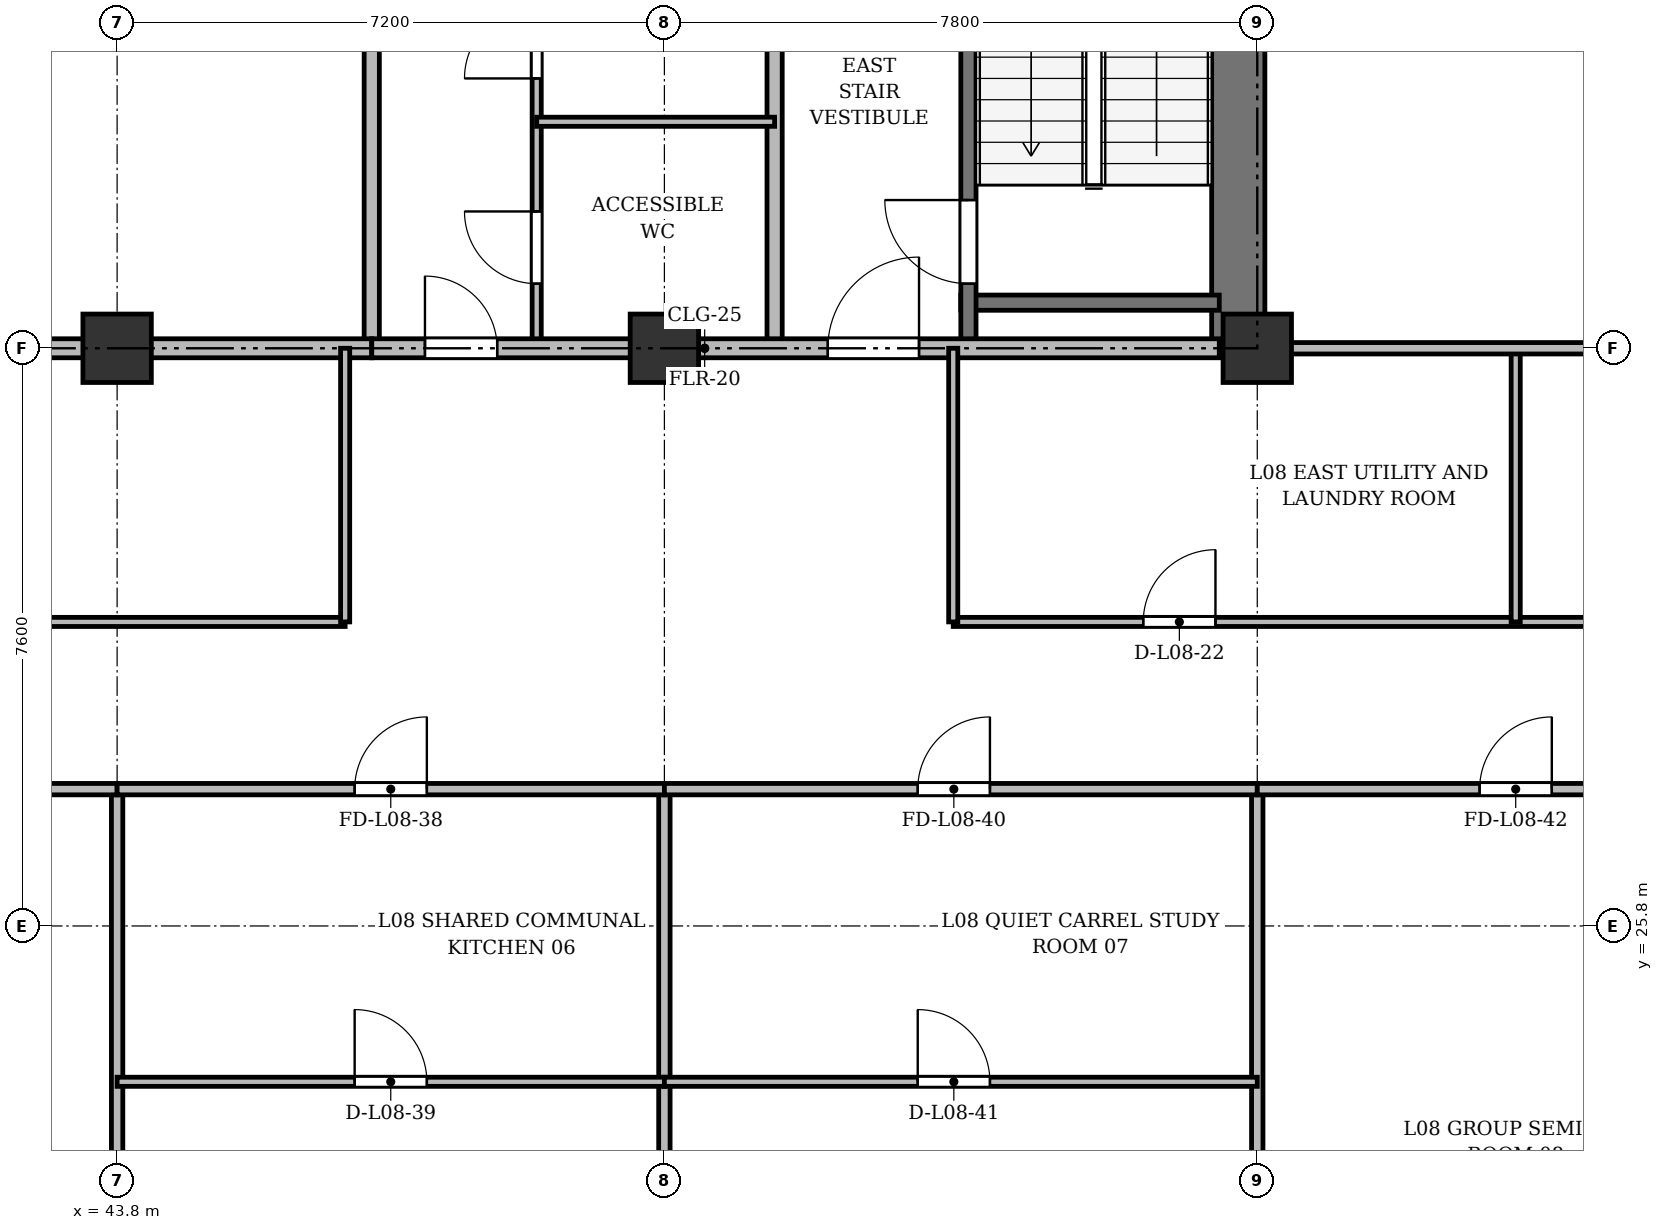
"""IFC4 building model, lengths in metres.
Left out: names, types, materials, properties, quantities, classifications, styles, units other than length and angle.
Written with IfcOpenShell. Run it as: python <this file> out.ifc"""

import sys

from ifc_helpers import new_model, si_unit, direction, frame, frame_2d, origin, origin_2d, place, context, subcontext, project, spatial, rectangle, extrude, source, transform, mapped, element, fill, save


model = new_model("IFC4")
c1 = context("Model", 3, precision=1e-05, world=origin(), true_north=direction((0.0, 1.0)))
c2 = subcontext(c1, "Body", "Model", "MODEL_VIEW")
j1 = project(units=[si_unit("LENGTHUNIT", "METRE"), si_unit("PLANEANGLEUNIT", "RADIAN")], contexts=[c1])
p1 = place(None, origin())
s1 = spatial("IfcSite", under=j1, at=p1, CompositionType="ELEMENT")
p2 = place(p1, origin())
s2 = spatial("IfcBuilding", under=s1, at=p2, CompositionType="ELEMENT")
p3 = place(p2, frame((0.0, 0.0, 34.3)))
s3 = spatial("IfcBuildingStorey", under=s2, at=p3, CompositionType="ELEMENT", Elevation=34.3)
m1 = source(origin(), c2, "Body", "SweptSolid", [
    extrude(rectangle(XDim=0.9, YDim=0.9, at=origin_2d()), origin(), (0.0, 0.0, 1.0), 3.6),
])
for number, where, z_axis, x_axis in (
    (1, (43.8, 33.4, 0.0), (0.0, 0.0, 1.0), (1.0, 0.0, 0.0)),
    (2, (51.0, 33.4, 0.0), (0.0, 0.0, 1.0), (1.0, 0.0, 0.0)),
    (3, (58.8, 33.4, 0.0), (0.0, 0.0, 1.0), (1.0, 0.0, 0.0)),
):
    element("IfcColumn", number, at=place(p3, frame(where, z_axis=z_axis, x_axis=x_axis)), inside=s3, PredefinedType="COLUMN", context=c2, shape_type="MappedRepresentation", body=[
        mapped(m1, transform((0.0, 0.0, 0.0), x_axis=(1.0, 0.0, 0.0), y_axis=(0.0, 1.0, 0.0), z_axis=(0.0, 0.0, 1.0), scale=1.0)),
    ])
p4 = place(p3, frame((58.55, 33.4, 0.0), z_axis=(0.0, 0.0, 1.0), x_axis=(0.0, 1.0, 0.0)))
e4 = element("IfcWall", 4, at=p4, inside=s3, PredefinedType="SHEAR", context=c2, shape_type="SweptSolid", body=[
    extrude(rectangle(XDim=11.7, YDim=0.7, at=frame_2d((5.85, 0.0))), origin(), (0.0, 0.0, 1.0), 3.34),
])
p5 = place(p3, frame((54.9, 34.0, 0.0), z_axis=(0.0, 0.0, 1.0), x_axis=(1.0, 0.0, 0.0)))
e5 = element("IfcWall", 5, at=p5, inside=s3, PredefinedType="SHEAR", context=c2, shape_type="SweptSolid", body=[
    extrude(rectangle(XDim=3.4, YDim=0.2, at=frame_2d((1.7, 0.0))), origin(), (0.0, 0.0, 1.0), 3.34),
])
p6 = place(p3, frame((55.0, 33.4, 0.0), z_axis=(0.0, 0.0, 1.0), x_axis=(0.0, 1.0, 0.0)))
e6 = element("IfcWall", 6, at=p6, inside=s3, PredefinedType="SHEAR", context=c2, shape_type="SweptSolid", body=[
    extrude(rectangle(XDim=11.1, YDim=0.2, at=frame_2d((5.55, 0.0))), origin(), (0.0, 0.0, 1.0), 3.34),
])
p7 = place(p6, frame((0.85, 0.0, 0.0)))
e7 = element("IfcOpeningElement", 7, at=p7, cuts=e6, PredefinedType="OPENING", context=c2, shape_type="SweptSolid", body=[
    extrude(rectangle(XDim=1.1, YDim=2.15, at=frame_2d((0.55, 1.075))), frame((0.0, 0.11, 0.0), z_axis=(0.0, -1.0, 0.0), x_axis=(1.0, 0.0, 0.0)), (0.0, 0.0, 1.0), 0.22),
])
p8 = place(p3, frame((47.15, 33.4, 0.0), z_axis=(0.0, 0.0, 1.0), x_axis=(0.0, 1.0, 0.0)))
e8 = element("IfcWall", 8, at=p8, inside=s3, PredefinedType="SOLIDWALL", context=c2, shape_type="SweptSolid", body=[
    extrude(rectangle(XDim=11.3, YDim=0.2, at=frame_2d((5.65, 0.0))), origin(), (0.0, 0.0, 1.0), 2.69),
])
p9 = place(p3, frame((26.3, 33.4, 0.0), z_axis=(0.0, 0.0, 1.0), x_axis=(1.0, 0.0, 0.0)))
e9 = element("IfcWall", 9, at=p9, inside=s3, PredefinedType="PARTITIONING", context=c2, shape_type="SweptSolid", body=[
    extrude(rectangle(XDim=20.85, YDim=0.25, at=frame_2d((10.425, 0.0))), origin(), (0.0, 0.0, 1.0), 2.69),
])
p10 = place(p9, frame((9.2, 0.0, 0.0)))
e10 = element("IfcOpeningElement", 10, at=p10, cuts=e9, PredefinedType="OPENING", context=c2, shape_type="SweptSolid", body=[
    extrude(rectangle(XDim=1.6, YDim=2.2, at=frame_2d((0.8, 1.1))), frame((0.0, 0.135, 0.0), z_axis=(0.0, -1.0, 0.0), x_axis=(1.0, 0.0, 0.0)), (0.0, 0.0, 1.0), 0.27),
])
p11 = place(p3, frame((52.45, 33.4, 0.0), z_axis=(0.0, 0.0, 1.0), x_axis=(0.0, 1.0, 0.0)))
e11 = element("IfcWall", 11, at=p11, inside=s3, PredefinedType="PARTITIONING", context=c2, shape_type="SweptSolid", body=[
    extrude(rectangle(XDim=8.65, YDim=0.2, at=frame_2d((4.325, 0.0))), origin(), (0.0, 0.0, 1.0), 2.69),
])
p12 = place(p11, frame((6.2, 0.0, 0.0)))
e12 = element("IfcOpeningElement", 12, at=p12, cuts=e11, PredefinedType="OPENING", context=c2, shape_type="SweptSolid", body=[
    extrude(rectangle(XDim=0.95, YDim=2.15, at=frame_2d((0.475, 1.075))), frame((0.0, 0.11, 0.0), z_axis=(0.0, -1.0, 0.0), x_axis=(1.0, 0.0, 0.0)), (0.0, 0.0, 1.0), 0.22),
])
p13 = place(p3, frame((49.32, 33.4, 0.0), z_axis=(0.0, 0.0, 1.0), x_axis=(0.0, 1.0, 0.0)))
e13 = element("IfcWall", 13, at=p13, inside=s3, PredefinedType="PARTITIONING", context=c2, shape_type="SweptSolid", body=[
    extrude(rectangle(XDim=8.6, YDim=0.12, at=frame_2d((4.3, 0.0))), origin(), (0.0, 0.0, 1.0), 2.69),
])
p14 = place(p13, frame((0.85, 0.0, 0.0)))
e14 = element("IfcOpeningElement", 14, at=p14, cuts=e13, PredefinedType="OPENING", context=c2, shape_type="SweptSolid", body=[
    extrude(rectangle(XDim=0.95, YDim=2.15, at=frame_2d((0.475, 1.075))), frame((0.0, 0.07, 0.0), z_axis=(0.0, -1.0, 0.0), x_axis=(1.0, 0.0, 0.0)), (0.0, 0.0, 1.0), 0.14),
])
p15 = place(p13, frame((3.55, 0.0, 0.0)))
e15 = element("IfcOpeningElement", 15, at=p15, cuts=e13, PredefinedType="OPENING", context=c2, shape_type="SweptSolid", body=[
    extrude(rectangle(XDim=0.95, YDim=2.15, at=frame_2d((0.475, 1.075))), frame((0.0, 0.07, 0.0), z_axis=(0.0, -1.0, 0.0), x_axis=(1.0, 0.0, 0.0)), (0.0, 0.0, 1.0), 0.14),
])
p16 = place(p13, frame((6.3, 0.0, 0.0)))
e16 = element("IfcOpeningElement", 16, at=p16, cuts=e13, PredefinedType="OPENING", context=c2, shape_type="SweptSolid", body=[
    extrude(rectangle(XDim=0.95, YDim=2.15, at=frame_2d((0.475, 1.075))), frame((0.0, 0.07, 0.0), z_axis=(0.0, -1.0, 0.0), x_axis=(1.0, 0.0, 0.0)), (0.0, 0.0, 1.0), 0.14),
])
p17 = place(p3, frame((49.32, 36.38, 0.0), z_axis=(0.0, 0.0, 1.0), x_axis=(1.0, 0.0, 0.0)))
e17 = element("IfcWall", 17, at=p17, inside=s3, PredefinedType="PARTITIONING", context=c2, shape_type="SweptSolid", body=[
    extrude(rectangle(XDim=3.13, YDim=0.12, at=frame_2d((1.565, 0.0))), origin(), (0.0, 0.0, 1.0), 2.752),
])
p18 = place(p3, frame((47.15, 33.4, 0.0), z_axis=(0.0, 0.0, 1.0), x_axis=(1.0, 0.0, 0.0)))
e18 = element("IfcWall", 18, at=p18, inside=s3, PredefinedType="PARTITIONING", context=c2, shape_type="SweptSolid", body=[
    extrude(rectangle(XDim=11.15, YDim=0.25, at=frame_2d((5.575, 0.0))), origin(), (0.0, 0.0, 1.0), 2.69),
])
p19 = place(p18, frame((0.7, 0.0, 0.0)))
e19 = element("IfcOpeningElement", 19, at=p19, cuts=e18, PredefinedType="OPENING", context=c2, shape_type="SweptSolid", body=[
    extrude(rectangle(XDim=0.95, YDim=2.15, at=frame_2d((0.475, 1.075))), frame((0.0, 0.135, 0.0), z_axis=(0.0, -1.0, 0.0), x_axis=(1.0, 0.0, 0.0)), (0.0, 0.0, 1.0), 0.27),
])
p20 = place(p18, frame((6.0, 0.0, 0.0)))
e20 = element("IfcOpeningElement", 20, at=p20, cuts=e18, PredefinedType="OPENING", context=c2, shape_type="SweptSolid", body=[
    extrude(rectangle(XDim=1.2, YDim=2.15, at=frame_2d((0.6, 1.075))), frame((0.0, 0.135, 0.0), z_axis=(0.0, -1.0, 0.0), x_axis=(1.0, 0.0, 0.0)), (0.0, 0.0, 1.0), 0.27),
])
p21 = place(p3, frame((38.2, 29.8, 0.0), z_axis=(0.0, 0.0, 1.0), x_axis=(1.0, 0.0, 0.0)))
e21 = element("IfcWall", 21, at=p21, inside=s3, PredefinedType="PARTITIONING", context=c2, shape_type="SweptSolid", body=[
    extrude(rectangle(XDim=8.6, YDim=0.12, at=frame_2d((4.3, 0.0))), origin(), (0.0, 0.0, 1.0), 2.752),
])
p22 = place(p21, frame((3.462, 0.0, 0.0)))
e22 = element("IfcOpeningElement", 22, at=p22, cuts=e21, PredefinedType="OPENING", context=c2, shape_type="SweptSolid", body=[
    extrude(rectangle(XDim=0.95, YDim=2.15, at=frame_2d((0.475, 1.075))), frame((0.0, 0.07, 0.0), z_axis=(0.0, -1.0, 0.0), x_axis=(1.0, 0.0, 0.0)), (0.0, 0.0, 1.0), 0.14),
])
p23 = place(p3, frame((54.8, 29.8, 0.0), z_axis=(0.0, 0.0, 1.0), x_axis=(1.0, 0.0, 0.0)))
e23 = element("IfcWall", 23, at=p23, inside=s3, PredefinedType="PARTITIONING", context=c2, shape_type="SweptSolid", body=[
    extrude(rectangle(XDim=14.85, YDim=0.12, at=frame_2d((7.425, 0.0))), origin(), (0.0, 0.0, 1.0), 2.752),
])
p24 = place(p23, frame((2.5, 0.0, 0.0)))
e24 = element("IfcOpeningElement", 24, at=p24, cuts=e23, PredefinedType="OPENING", context=c2, shape_type="SweptSolid", body=[
    extrude(rectangle(XDim=0.95, YDim=2.15, at=frame_2d((0.475, 1.075))), frame((0.0, 0.07, 0.0), z_axis=(0.0, -1.0, 0.0), x_axis=(1.0, 0.0, 0.0)), (0.0, 0.0, 1.0), 0.14),
])
p25 = place(p23, frame((9.2, 0.0, 0.0)))
e25 = element("IfcOpeningElement", 25, at=p25, cuts=e23, PredefinedType="OPENING", context=c2, shape_type="SweptSolid", body=[
    extrude(rectangle(XDim=0.95, YDim=2.15, at=frame_2d((0.475, 1.075))), frame((0.0, 0.07, 0.0), z_axis=(0.0, -1.0, 0.0), x_axis=(1.0, 0.0, 0.0)), (0.0, 0.0, 1.0), 0.14),
])
for number, where, z_axis, x_axis in (
    (26, (62.2, 29.8, 0.0), (0.0, 0.0, 1.0), (0.0, 1.0, 0.0)),
    (27, (46.8, 29.8, 0.0), (0.0, 0.0, 1.0), (0.0, 1.0, 0.0)),
    (28, (54.8, 29.8, 0.0), (0.0, 0.0, 1.0), (0.0, 1.0, 0.0)),
):
    element("IfcWall", number, at=place(p3, frame(where, z_axis=z_axis, x_axis=x_axis)), inside=s3, PredefinedType="PARTITIONING", context=c2, shape_type="SweptSolid", body=[
        extrude(rectangle(XDim=3.6, YDim=0.12, at=frame_2d((1.8, 0.0))), origin(), (0.0, 0.0, 1.0), 2.69),
    ])
p26 = place(p3, frame((58.8, 33.4, 0.0), z_axis=(0.0, 0.0, 1.0), x_axis=(1.0, 0.0, 0.0)))
e29 = element("IfcWall", 29, at=p26, inside=s3, PredefinedType="PARTITIONING", context=c2, shape_type="SweptSolid", body=[
    extrude(rectangle(XDim=10.85, YDim=0.15, at=frame_2d((5.425, 0.0))), origin(), (0.0, 0.0, 1.0), 2.69),
])
p27 = place(p26, frame((4.76, 0.0, 0.0)))
e30 = element("IfcOpeningElement", 30, at=p27, cuts=e29, PredefinedType="OPENING", context=c2, shape_type="SweptSolid", body=[
    extrude(rectangle(XDim=0.95, YDim=2.15, at=frame_2d((0.475, 1.075))), frame((0.0, 0.085, 0.0), z_axis=(0.0, -1.0, 0.0), x_axis=(1.0, 0.0, 0.0)), (0.0, 0.0, 1.0), 0.17),
])
for number, where, z_axis, x_axis in (
    (31, (43.8, 3.145, 0.0), (0.0, 0.0, 1.0), (0.0, 1.0, 0.0)),
    (32, (51.0, 3.145, 0.0), (0.0, 0.0, 1.0), (0.0, 1.0, 0.0)),
    (33, (58.8, 3.145, 0.0), (0.0, 0.0, 1.0), (0.0, 1.0, 0.0)),
):
    element("IfcWall", number, at=place(p3, frame(where, z_axis=z_axis, x_axis=x_axis)), inside=s3, PredefinedType="PARTITIONING", context=c2, shape_type="SweptSolid", body=[
        extrude(rectangle(XDim=24.455, YDim=0.15, at=frame_2d((12.228, 0.0))), origin(), (0.0, 0.0, 1.0), 2.752),
    ])
p28 = place(p3, frame((30.6, 27.6, 0.0), z_axis=(0.0, 0.0, 1.0), x_axis=(1.0, 0.0, 0.0)))
e34 = element("IfcWall", 34, at=p28, inside=s3, PredefinedType="PARTITIONING", context=c2, shape_type="SweptSolid", body=[
    extrude(rectangle(XDim=13.2, YDim=0.15, at=frame_2d((6.6, 0.0))), origin(), (0.0, 0.0, 1.0), 2.752),
])
p29 = place(p28, frame((5.8, 0.0, 0.0)))
e35 = element("IfcOpeningElement", 35, at=p29, cuts=e34, PredefinedType="OPENING", context=c2, shape_type="SweptSolid", body=[
    extrude(rectangle(XDim=1.6, YDim=2.2, at=frame_2d((0.8, 1.1))), frame((0.0, 0.085, 0.0), z_axis=(0.0, -1.0, 0.0), x_axis=(1.0, 0.0, 0.0)), (0.0, 0.0, 1.0), 0.17),
])
p30 = place(p3, frame((43.8, 27.6, 0.0), z_axis=(0.0, 0.0, 1.0), x_axis=(1.0, 0.0, 0.0)))
e36 = element("IfcWall", 36, at=p30, inside=s3, PredefinedType="PARTITIONING", context=c2, shape_type="SweptSolid", body=[
    extrude(rectangle(XDim=7.2, YDim=0.15, at=frame_2d((3.6, 0.0))), origin(), (0.0, 0.0, 1.0), 2.752),
])
p31 = place(p30, frame((3.125, 0.0, 0.0)))
e37 = element("IfcOpeningElement", 37, at=p31, cuts=e36, PredefinedType="OPENING", context=c2, shape_type="SweptSolid", body=[
    extrude(rectangle(XDim=0.95, YDim=2.15, at=frame_2d((0.475, 1.075))), frame((0.0, 0.085, 0.0), z_axis=(0.0, -1.0, 0.0), x_axis=(1.0, 0.0, 0.0)), (0.0, 0.0, 1.0), 0.17),
])
p32 = place(p3, frame((43.8, 23.75, 0.0), z_axis=(0.0, 0.0, 1.0), x_axis=(1.0, 0.0, 0.0)))
e38 = element("IfcWall", 38, at=p32, inside=s3, PredefinedType="PARTITIONING", context=c2, shape_type="SweptSolid", body=[
    extrude(rectangle(XDim=7.2, YDim=0.12, at=frame_2d((3.6, 0.0))), origin(), (0.0, 0.0, 1.0), 2.752),
])
p33 = place(p32, frame((3.125, 0.0, 0.0)))
e39 = element("IfcOpeningElement", 39, at=p33, cuts=e38, PredefinedType="OPENING", context=c2, shape_type="SweptSolid", body=[
    extrude(rectangle(XDim=0.95, YDim=2.15, at=frame_2d((0.475, 1.075))), frame((0.0, 0.07, 0.0), z_axis=(0.0, -1.0, 0.0), x_axis=(1.0, 0.0, 0.0)), (0.0, 0.0, 1.0), 0.14),
])
p34 = place(p3, frame((51.0, 27.6, 0.0), z_axis=(0.0, 0.0, 1.0), x_axis=(1.0, 0.0, 0.0)))
e40 = element("IfcWall", 40, at=p34, inside=s3, PredefinedType="PARTITIONING", context=c2, shape_type="SweptSolid", body=[
    extrude(rectangle(XDim=7.8, YDim=0.15, at=frame_2d((3.9, 0.0))), origin(), (0.0, 0.0, 1.0), 2.752),
])
p35 = place(p34, frame((3.333, 0.0, 0.0)))
e41 = element("IfcOpeningElement", 41, at=p35, cuts=e40, PredefinedType="OPENING", context=c2, shape_type="SweptSolid", body=[
    extrude(rectangle(XDim=0.95, YDim=2.15, at=frame_2d((0.475, 1.075))), frame((0.0, 0.085, 0.0), z_axis=(0.0, -1.0, 0.0), x_axis=(1.0, 0.0, 0.0)), (0.0, 0.0, 1.0), 0.17),
])
p36 = place(p3, frame((51.0, 23.75, 0.0), z_axis=(0.0, 0.0, 1.0), x_axis=(1.0, 0.0, 0.0)))
e42 = element("IfcWall", 42, at=p36, inside=s3, PredefinedType="PARTITIONING", context=c2, shape_type="SweptSolid", body=[
    extrude(rectangle(XDim=7.8, YDim=0.12, at=frame_2d((3.9, 0.0))), origin(), (0.0, 0.0, 1.0), 2.752),
])
p37 = place(p36, frame((3.333, 0.0, 0.0)))
e43 = element("IfcOpeningElement", 43, at=p37, cuts=e42, PredefinedType="OPENING", context=c2, shape_type="SweptSolid", body=[
    extrude(rectangle(XDim=0.95, YDim=2.15, at=frame_2d((0.475, 1.075))), frame((0.0, 0.07, 0.0), z_axis=(0.0, -1.0, 0.0), x_axis=(1.0, 0.0, 0.0)), (0.0, 0.0, 1.0), 0.14),
])
p38 = place(p3, frame((58.8, 27.6, 0.0), z_axis=(0.0, 0.0, 1.0), x_axis=(1.0, 0.0, 0.0)))
e44 = element("IfcWall", 44, at=p38, inside=s3, PredefinedType="PARTITIONING", context=c2, shape_type="SweptSolid", body=[
    extrude(rectangle(XDim=6.8, YDim=0.15, at=frame_2d((3.4, 0.0))), origin(), (0.0, 0.0, 1.0), 2.752),
])
p39 = place(p38, frame((2.925, 0.0, 0.0)))
e45 = element("IfcOpeningElement", 45, at=p39, cuts=e44, PredefinedType="OPENING", context=c2, shape_type="SweptSolid", body=[
    extrude(rectangle(XDim=0.95, YDim=2.15, at=frame_2d((0.475, 1.075))), frame((0.0, 0.085, 0.0), z_axis=(0.0, -1.0, 0.0), x_axis=(1.0, 0.0, 0.0)), (0.0, 0.0, 1.0), 0.17),
])
m2 = source(origin(), c2, "Body", "SweptSolid", [
    extrude(rectangle(XDim=1.1, YDim=2.15, at=frame_2d((0.55, 1.075))), frame((0.0, 0.025, 0.0), z_axis=(0.0, -1.0, 0.0), x_axis=(1.0, 0.0, 0.0)), (0.0, 0.0, 1.0), 0.05),
])
p40 = place(p7, origin())
e46 = element("IfcDoor", 46, at=p40, inside=s3, OperationType="SINGLE_SWING_RIGHT", PredefinedType="DOOR", context=c2, shape_type="MappedRepresentation", body=[
    mapped(m2, transform((0.0, 0.0, 0.0), x_axis=(1.0, 0.0, 0.0), y_axis=(0.0, 1.0, 0.0), z_axis=(0.0, 0.0, 1.0), scale=1.0)),
])
fill(e7, e46)
m3 = source(origin(), c2, "Body", "SweptSolid", [
    extrude(rectangle(XDim=0.95, YDim=2.15, at=frame_2d((0.475, 1.075))), frame((0.0, 0.025, 0.0), z_axis=(0.0, -1.0, 0.0), x_axis=(1.0, 0.0, 0.0)), (0.0, 0.0, 1.0), 0.05),
])
p41 = place(p14, origin())
e47 = element("IfcDoor", 47, at=p41, inside=s3, OperationType="SINGLE_SWING_RIGHT", PredefinedType="DOOR", context=c2, shape_type="MappedRepresentation", body=[
    mapped(m3, transform((0.0, 0.0, 0.0), x_axis=(1.0, 0.0, 0.0), y_axis=(0.0, 1.0, 0.0), z_axis=(0.0, 0.0, 1.0), scale=1.0)),
])
fill(e14, e47)
p42 = place(p15, origin())
e48 = element("IfcDoor", 48, at=p42, inside=s3, OperationType="SINGLE_SWING_LEFT", PredefinedType="DOOR", context=c2, shape_type="MappedRepresentation", body=[
    mapped(m3, transform((0.0, 0.0, 0.0), x_axis=(1.0, 0.0, 0.0), y_axis=(0.0, 1.0, 0.0), z_axis=(0.0, 0.0, 1.0), scale=1.0)),
])
fill(e15, e48)
p43 = place(p19, origin())
e49 = element("IfcDoor", 49, at=p43, inside=s3, OperationType="SINGLE_SWING_LEFT", PredefinedType="DOOR", context=c2, shape_type="MappedRepresentation", body=[
    mapped(m3, transform((0.0, 0.0, 0.0), x_axis=(1.0, 0.0, 0.0), y_axis=(0.0, 1.0, 0.0), z_axis=(0.0, 0.0, 1.0), scale=1.0)),
])
fill(e19, e49)
m4 = source(origin(), c2, "Body", "SweptSolid", [
    extrude(rectangle(XDim=1.2, YDim=2.15, at=frame_2d((0.6, 1.075))), frame((0.0, 0.025, 0.0), z_axis=(0.0, -1.0, 0.0), x_axis=(1.0, 0.0, 0.0)), (0.0, 0.0, 1.0), 0.05),
])
p44 = place(p20, origin())
e50 = element("IfcDoor", 50, at=p44, inside=s3, OperationType="SINGLE_SWING_RIGHT", PredefinedType="DOOR", context=c2, shape_type="MappedRepresentation", body=[
    mapped(m4, transform((0.0, 0.0, 0.0), x_axis=(1.0, 0.0, 0.0), y_axis=(0.0, 1.0, 0.0), z_axis=(0.0, 0.0, 1.0), scale=1.0)),
])
fill(e20, e50)
p45 = place(p24, origin())
e51 = element("IfcDoor", 51, at=p45, inside=s3, OperationType="SINGLE_SWING_RIGHT", PredefinedType="DOOR", context=c2, shape_type="MappedRepresentation", body=[
    mapped(m3, transform((0.0, 0.0, 0.0), x_axis=(1.0, 0.0, 0.0), y_axis=(0.0, 1.0, 0.0), z_axis=(0.0, 0.0, 1.0), scale=1.0)),
])
fill(e24, e51)
p46 = place(p31, origin())
e52 = element("IfcDoor", 52, at=p46, inside=s3, OperationType="SINGLE_SWING_RIGHT", PredefinedType="DOOR", context=c2, shape_type="MappedRepresentation", body=[
    mapped(m3, transform((0.0, 0.0, 0.0), x_axis=(1.0, 0.0, 0.0), y_axis=(0.0, 1.0, 0.0), z_axis=(0.0, 0.0, 1.0), scale=1.0)),
])
fill(e37, e52)
p47 = place(p33, origin())
e53 = element("IfcDoor", 53, at=p47, inside=s3, OperationType="SINGLE_SWING_LEFT", PredefinedType="DOOR", context=c2, shape_type="MappedRepresentation", body=[
    mapped(m3, transform((0.0, 0.0, 0.0), x_axis=(1.0, 0.0, 0.0), y_axis=(0.0, 1.0, 0.0), z_axis=(0.0, 0.0, 1.0), scale=1.0)),
])
fill(e39, e53)
p48 = place(p35, origin())
e54 = element("IfcDoor", 54, at=p48, inside=s3, OperationType="SINGLE_SWING_RIGHT", PredefinedType="DOOR", context=c2, shape_type="MappedRepresentation", body=[
    mapped(m3, transform((0.0, 0.0, 0.0), x_axis=(1.0, 0.0, 0.0), y_axis=(0.0, 1.0, 0.0), z_axis=(0.0, 0.0, 1.0), scale=1.0)),
])
fill(e41, e54)
p49 = place(p37, origin())
e55 = element("IfcDoor", 55, at=p49, inside=s3, OperationType="SINGLE_SWING_LEFT", PredefinedType="DOOR", context=c2, shape_type="MappedRepresentation", body=[
    mapped(m3, transform((0.0, 0.0, 0.0), x_axis=(1.0, 0.0, 0.0), y_axis=(0.0, 1.0, 0.0), z_axis=(0.0, 0.0, 1.0), scale=1.0)),
])
fill(e43, e55)
p50 = place(p39, origin())
e56 = element("IfcDoor", 56, at=p50, inside=s3, OperationType="SINGLE_SWING_RIGHT", PredefinedType="DOOR", context=c2, shape_type="MappedRepresentation", body=[
    mapped(m3, transform((0.0, 0.0, 0.0), x_axis=(1.0, 0.0, 0.0), y_axis=(0.0, 1.0, 0.0), z_axis=(0.0, 0.0, 1.0), scale=1.0)),
])
fill(e45, e56)
save(model, sys.argv[1])
